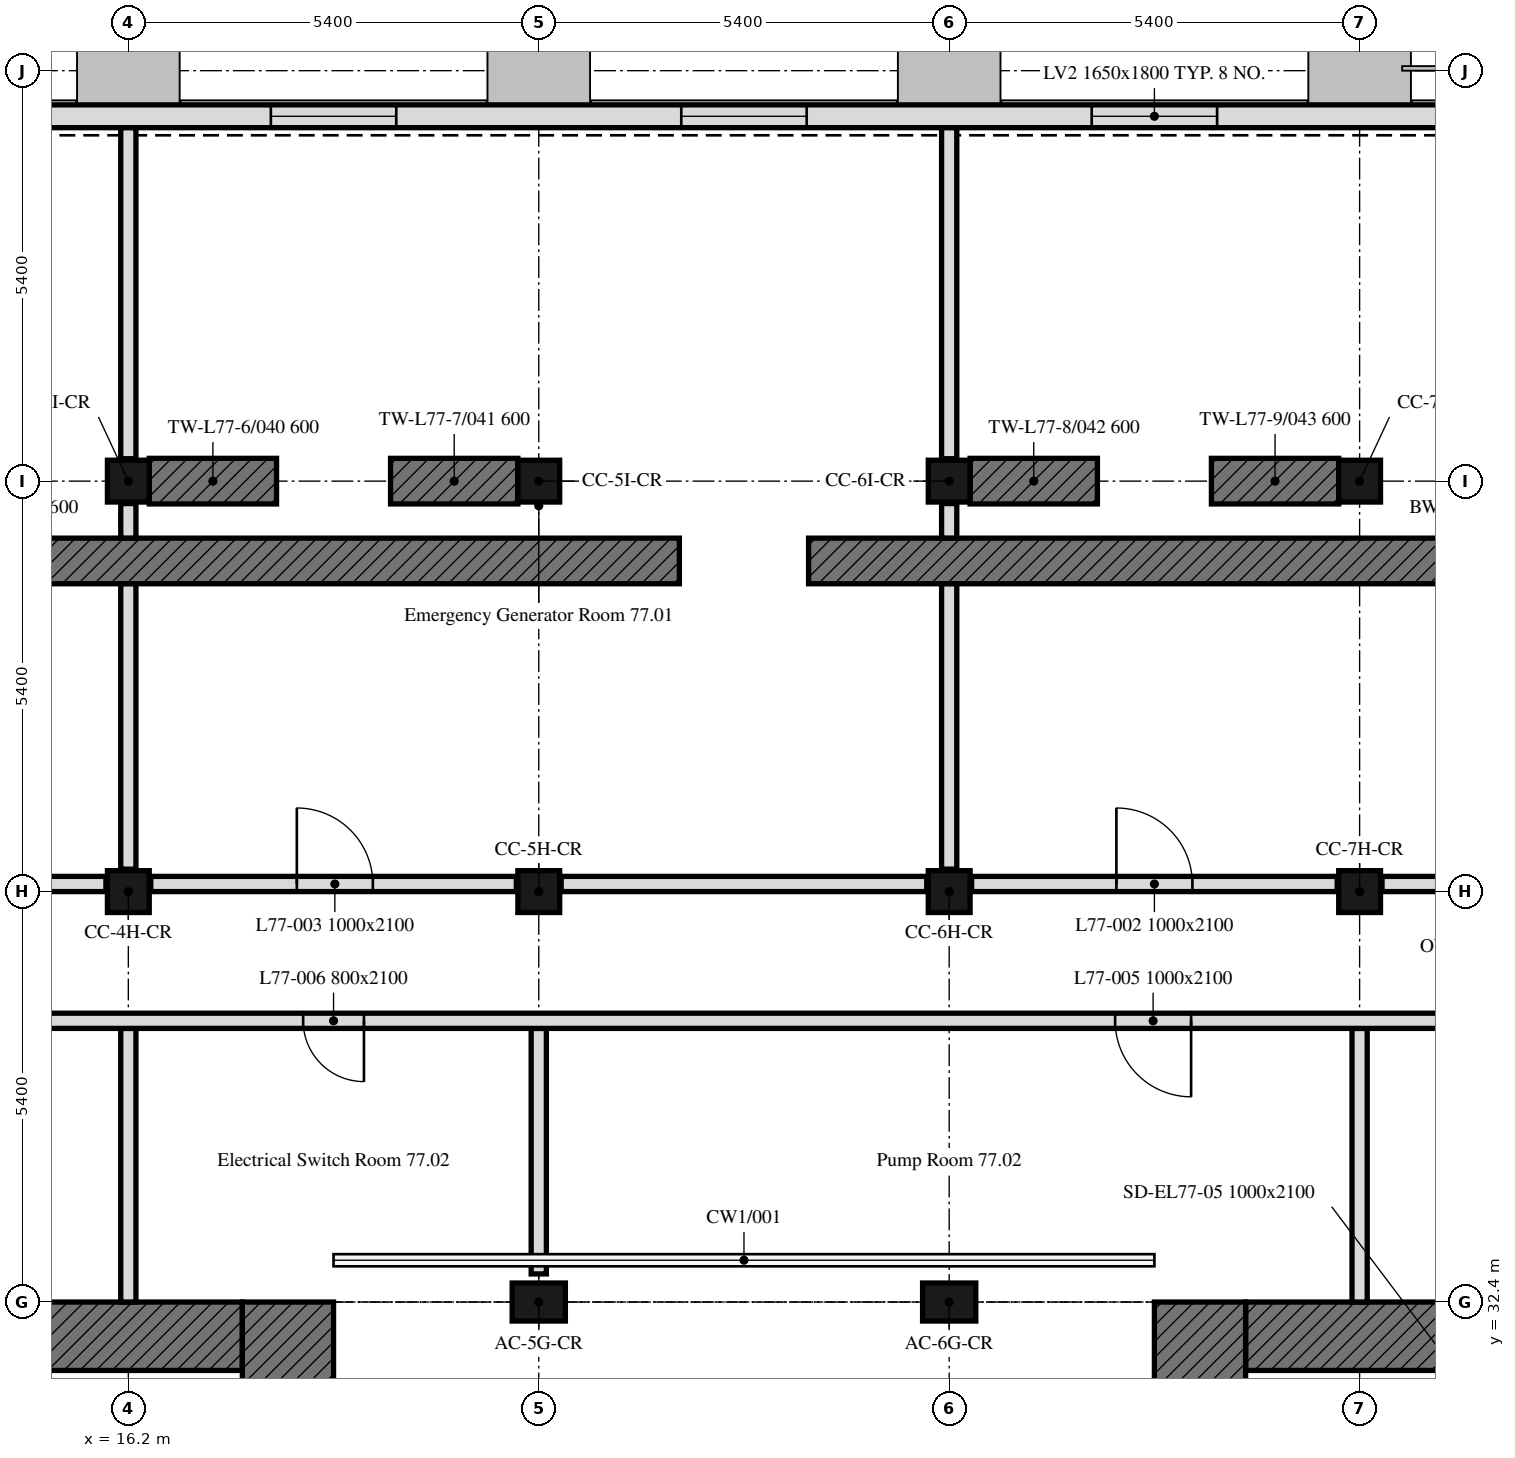
"""IFC4 building model, lengths in metres.
Left out: names, types, materials, properties, quantities, classifications, styles, units other than length and angle.
Written with IfcOpenShell. Run it as: python <this file> out.ifc"""

import sys

from ifc_helpers import new_model, si_unit, direction, frame, frame_2d, origin, origin_2d, place, context, subcontext, project, spatial, polyline, rectangle, outline, extrude, element, fill, save


model = new_model("IFC4")
c1 = context("Model", 3, precision=1e-05, world=origin(), true_north=direction((0.0, 1.0)))
c2 = subcontext(c1, "Body", "Model", "MODEL_VIEW")
j1 = project(units=[si_unit("LENGTHUNIT", "METRE"), si_unit("PLANEANGLEUNIT", "RADIAN")], contexts=[c1])
p1 = place(None, origin())
s1 = spatial("IfcSite", under=j1, at=p1, CompositionType="ELEMENT")
p2 = place(p1, origin())
s2 = spatial("IfcBuilding", under=s1, at=p2, CompositionType="ELEMENT")
p3 = place(p2, frame((0.0, 0.0, 308.2)))
s3 = spatial("IfcBuildingStorey", under=s2, at=p3, CompositionType="ELEMENT", Elevation=308.2)
for number, where, z_axis, x_axis in (
    (1, (21.6, 32.4, 0.0), (0.0, 0.0, 1.0), (1.0, 0.0, 0.0)),
    (2, (27.0, 32.4, 0.0), (0.0, 0.0, 1.0), (1.0, 0.0, 0.0)),
):
    element("IfcColumn", number, at=place(p3, frame(where, z_axis=z_axis, x_axis=x_axis)), inside=s3, PredefinedType="COLUMN", context=c2, shape_type="SweptSolid", body=[
        extrude(rectangle(XDim=0.7, YDim=0.5, at=origin_2d()), origin(), (0.0, 0.0, 1.0), 4.2),
    ])
for number, where, z_axis, x_axis in (
    (3, (16.2, 37.8, 0.0), (0.0, 0.0, 1.0), (1.0, 0.0, 0.0)),
    (4, (21.6, 37.8, 0.0), (0.0, 0.0, 1.0), (1.0, 0.0, 0.0)),
    (5, (27.0, 37.8, 0.0), (0.0, 0.0, 1.0), (1.0, 0.0, 0.0)),
    (6, (32.4, 37.8, 0.0), (0.0, 0.0, 1.0), (1.0, 0.0, 0.0)),
    (7, (16.2, 43.2, 0.0), (0.0, 0.0, 1.0), (1.0, 0.0, 0.0)),
    (8, (21.6, 43.2, 0.0), (0.0, 0.0, 1.0), (1.0, 0.0, 0.0)),
    (9, (27.0, 43.2, 0.0), (0.0, 0.0, 1.0), (1.0, 0.0, 0.0)),
    (10, (32.4, 43.2, 0.0), (0.0, 0.0, 1.0), (1.0, 0.0, 0.0)),
):
    element("IfcColumn", number, at=place(p3, frame(where, z_axis=z_axis, x_axis=x_axis)), inside=s3, PredefinedType="COLUMN", context=c2, shape_type="SweptSolid", body=[
        extrude(rectangle(XDim=0.55, YDim=0.55, at=origin_2d()), origin(), (0.0, 0.0, 1.0), 4.2),
    ])
for number, where, z_axis, x_axis in (
    (11, (6.45, 42.15, 0.0), (0.0, 0.0, 1.0), (1.0, 0.0, 0.0)),
    (12, (25.15, 42.15, 0.0), (0.0, 0.0, 1.0), (1.0, 0.0, 0.0)),
):
    element("IfcWall", number, at=place(p3, frame(where, z_axis=z_axis, x_axis=x_axis)), inside=s3, PredefinedType="SHEAR", context=c2, shape_type="SweptSolid", body=[
        extrude(rectangle(XDim=17.0, YDim=0.6, at=frame_2d((8.5, 0.0))), origin(), (0.0, 0.0, 1.0), 4.2),
    ])
p4 = place(p3, frame((16.475, 43.2, 0.0), z_axis=(0.0, 0.0, 1.0), x_axis=(1.0, 0.0, 0.0)))
e13 = element("IfcWall", 13, at=p4, inside=s3, PredefinedType="SHEAR", context=c2, shape_type="SweptSolid", body=[
    extrude(rectangle(XDim=1.675, YDim=0.6, at=frame_2d((0.837, 0.0))), origin(), (0.0, 0.0, 1.0), 4.2),
])
for number, where, z_axis, x_axis in (
    (14, (19.65, 43.2, 0.0), (0.0, 0.0, 1.0), (1.0, 0.0, 0.0)),
    (15, (27.275, 43.2, 0.0), (0.0, 0.0, 1.0), (1.0, 0.0, 0.0)),
    (16, (30.45, 43.2, 0.0), (0.0, 0.0, 1.0), (1.0, 0.0, 0.0)),
):
    element("IfcWall", number, at=place(p3, frame(where, z_axis=z_axis, x_axis=x_axis)), inside=s3, PredefinedType="SHEAR", context=c2, shape_type="SweptSolid", body=[
        extrude(rectangle(XDim=1.675, YDim=0.6, at=frame_2d((0.837, 0.0))), origin(), (0.0, 0.0, 1.0), 4.2),
    ])
p5 = place(p3, frame((37.614, 48.0, 0.0), z_axis=(0.0, 0.0, 1.0), x_axis=(-1.0, 0.0, 0.0)))
e17 = element("IfcWall", 17, at=p5, inside=s3, PredefinedType="SOLIDWALL", context=c2, shape_type="SweptSolid", body=[
    extrude(outline(polyline([(0.0, 0.0), (32.027, 0.0), (32.027, 4.2), (31.434, 4.2), (30.841, 4.2), (30.248, 4.2), (29.655, 4.2), (29.062, 4.2), (28.469, 4.2), (27.875, 4.2), (27.282, 4.2), (26.689, 4.2), (26.096, 4.2), (25.503, 4.2), (24.91, 4.2), (24.317, 4.2), (23.724, 4.2), (23.131, 4.2), (22.538, 4.2), (21.945, 4.2), (21.352, 4.2), (20.758, 4.2), (20.165, 4.2), (19.572, 4.2), (18.979, 4.2), (18.386, 4.2), (17.793, 4.2), (17.2, 4.2), (16.607, 4.2), (16.014, 4.2), (15.42, 4.2), (14.827, 4.2), (14.234, 4.2), (13.641, 4.2), (13.048, 4.2), (12.455, 4.2), (11.862, 4.2), (11.269, 4.2), (10.676, 4.2), (10.083, 4.2), (9.49, 4.2), (8.896, 4.2), (8.303, 4.2), (7.71, 4.2), (7.117, 4.2), (6.524, 4.2), (5.931, 4.2), (5.338, 4.2), (4.745, 4.2), (4.152, 4.2), (3.559, 4.2), (2.966, 4.2), (2.372, 4.2), (1.779, 4.2), (1.186, 4.2), (0.593, 4.2), (0.0, 4.2), (0.0, 0.0)])), frame((0.0, 0.15, 0.0), z_axis=(0.0, -1.0, 0.0), x_axis=(1.0, 0.0, 0.0)), (0.0, 0.0, 1.0), 0.3),
])
p6 = place(p5, frame((1.014, 0.0, 0.6)))
e18 = element("IfcOpeningElement", 18, at=p6, cuts=e17, PredefinedType="OPENING", context=c2, shape_type="SweptSolid", body=[
    extrude(rectangle(XDim=3.0, YDim=1.8, at=frame_2d((1.5, 0.9))), frame((0.0, 0.16, 0.0), z_axis=(0.0, -1.0, 0.0), x_axis=(1.0, 0.0, 0.0)), (0.0, 0.0, 1.0), 0.32),
])
p7 = place(p5, frame((7.089, 0.0, 0.6)))
e19 = element("IfcOpeningElement", 19, at=p7, cuts=e17, PredefinedType="OPENING", context=c2, shape_type="SweptSolid", body=[
    extrude(rectangle(XDim=1.65, YDim=1.8, at=frame_2d((0.825, 0.9))), frame((0.0, 0.16, 0.0), z_axis=(0.0, -1.0, 0.0), x_axis=(1.0, 0.0, 0.0)), (0.0, 0.0, 1.0), 0.32),
])
p8 = place(p5, frame((12.489, 0.0, 0.6)))
e20 = element("IfcOpeningElement", 20, at=p8, cuts=e17, PredefinedType="OPENING", context=c2, shape_type="SweptSolid", body=[
    extrude(rectangle(XDim=1.65, YDim=1.8, at=frame_2d((0.825, 0.9))), frame((0.0, 0.16, 0.0), z_axis=(0.0, -1.0, 0.0), x_axis=(1.0, 0.0, 0.0)), (0.0, 0.0, 1.0), 0.32),
])
p9 = place(p5, frame((17.889, 0.0, 0.6)))
e21 = element("IfcOpeningElement", 21, at=p9, cuts=e17, PredefinedType="OPENING", context=c2, shape_type="SweptSolid", body=[
    extrude(rectangle(XDim=1.65, YDim=1.8, at=frame_2d((0.825, 0.9))), frame((0.0, 0.16, 0.0), z_axis=(0.0, -1.0, 0.0), x_axis=(1.0, 0.0, 0.0)), (0.0, 0.0, 1.0), 0.32),
])
p10 = place(p5, frame((23.289, 0.0, 0.6)))
e22 = element("IfcOpeningElement", 22, at=p10, cuts=e17, PredefinedType="OPENING", context=c2, shape_type="SweptSolid", body=[
    extrude(rectangle(XDim=1.65, YDim=1.8, at=frame_2d((0.825, 0.9))), frame((0.0, 0.16, 0.0), z_axis=(0.0, -1.0, 0.0), x_axis=(1.0, 0.0, 0.0)), (0.0, 0.0, 1.0), 0.32),
])
p11 = place(p5, frame((28.014, 0.0, 0.6)))
e23 = element("IfcOpeningElement", 23, at=p11, cuts=e17, PredefinedType="OPENING", context=c2, shape_type="SweptSolid", body=[
    extrude(rectangle(XDim=3.0, YDim=1.8, at=frame_2d((1.5, 0.9))), frame((0.0, 0.16, 0.0), z_axis=(0.0, -1.0, 0.0), x_axis=(1.0, 0.0, 0.0)), (0.0, 0.0, 1.0), 0.32),
])
p12 = place(p3, frame((6.6, 31.95, 0.0), z_axis=(0.0, 0.0, 1.0), x_axis=(1.0, 0.0, 0.0)))
e24 = element("IfcWall", 24, at=p12, inside=s3, PredefinedType="SOLIDWALL", context=c2, shape_type="SweptSolid", body=[
    extrude(rectangle(XDim=11.1, YDim=0.9, at=frame_2d((5.55, 0.0))), origin(), (0.0, 0.0, 1.0), 4.2),
])
p13 = place(p12, frame((3.55, 0.0, 0.0)))
e25 = element("IfcOpeningElement", 25, at=p13, cuts=e24, PredefinedType="OPENING", context=c2, shape_type="SweptSolid", body=[
    extrude(rectangle(XDim=2.0, YDim=2.4, at=frame_2d((1.0, 1.2))), frame((0.0, 0.45, 0.0), z_axis=(0.0, -1.0, 0.0), x_axis=(1.0, 0.0, 0.0)), (0.0, 0.0, 1.0), 0.9),
])
p14 = place(p3, frame((18.3, 32.4, 0.0), z_axis=(0.0, 0.0, 1.0), x_axis=(0.0, -1.0, 0.0)))
e26 = element("IfcWall", 26, at=p14, inside=s3, PredefinedType="SOLIDWALL", context=c2, shape_type="SweptSolid", body=[
    extrude(rectangle(XDim=16.2, YDim=1.2, at=frame_2d((8.1, 0.0))), origin(), (0.0, 0.0, 1.0), 4.2),
])
p15 = place(p3, frame((30.9, 31.95, 0.0), z_axis=(0.0, 0.0, 1.0), x_axis=(1.0, 0.0, 0.0)))
e27 = element("IfcWall", 27, at=p15, inside=s3, PredefinedType="SOLIDWALL", context=c2, shape_type="SweptSolid", body=[
    extrude(rectangle(XDim=11.1, YDim=0.9, at=frame_2d((5.55, 0.0))), origin(), (0.0, 0.0, 1.0), 4.2),
])
p16 = place(p15, frame((5.55, 0.0, 0.0)))
e28 = element("IfcOpeningElement", 28, at=p16, cuts=e27, PredefinedType="OPENING", context=c2, shape_type="SweptSolid", body=[
    extrude(rectangle(XDim=2.0, YDim=2.4, at=frame_2d((1.0, 1.2))), frame((0.0, 0.45, 0.0), z_axis=(0.0, -1.0, 0.0), x_axis=(1.0, 0.0, 0.0)), (0.0, 0.0, 1.0), 0.9),
])
p17 = place(p3, frame((30.3, 16.2, 0.0), z_axis=(0.0, 0.0, 1.0), x_axis=(0.0, 1.0, 0.0)))
e29 = element("IfcWall", 29, at=p17, inside=s3, PredefinedType="SOLIDWALL", context=c2, shape_type="SweptSolid", body=[
    extrude(rectangle(XDim=16.2, YDim=1.2, at=frame_2d((8.1, 0.0))), origin(), (0.0, 0.0, 1.0), 4.2),
])
p18 = place(p3, frame((27.0, 47.849, 0.0), z_axis=(0.0, 0.0, 1.0), x_axis=(0.0, -1.0, 0.0)))
e30 = element("IfcWall", 30, at=p18, inside=s3, PredefinedType="PARTITIONING", context=c2, shape_type="SweptSolid", body=[
    extrude(rectangle(XDim=4.354, YDim=0.2, at=frame_2d((2.177, 0.0))), origin(), (0.0, 0.0, 1.0), 3.45),
])
p19 = place(p3, frame((27.0, 42.905, 0.0), z_axis=(0.0, 0.0, 1.0), x_axis=(0.0, -1.0, 0.0)))
e31 = element("IfcWall", 31, at=p19, inside=s3, PredefinedType="PARTITIONING", context=c2, shape_type="SweptSolid", body=[
    extrude(rectangle(XDim=0.454, YDim=0.2, at=frame_2d((0.227, 0.0))), origin(), (0.0, 0.0, 1.0), 3.45),
])
p20 = place(p3, frame((27.0, 41.849, 0.0), z_axis=(0.0, 0.0, 1.0), x_axis=(0.0, -1.0, 0.0)))
e32 = element("IfcWall", 32, at=p20, inside=s3, PredefinedType="PARTITIONING", context=c2, shape_type="SweptSolid", body=[
    extrude(rectangle(XDim=3.754, YDim=0.2, at=frame_2d((1.877, 0.0))), origin(), (0.0, 0.0, 1.0), 3.45),
])
p21 = place(p3, frame((27.295, 37.9, 0.0), z_axis=(0.0, 0.0, 1.0), x_axis=(1.0, 0.0, 0.0)))
e33 = element("IfcWall", 33, at=p21, inside=s3, PredefinedType="PARTITIONING", context=c2, shape_type="SweptSolid", body=[
    extrude(rectangle(XDim=4.81, YDim=0.2, at=frame_2d((2.405, 0.0))), origin(), (0.0, 0.0, 1.0), 4.2),
])
p22 = place(p21, frame((1.905, 0.0, 0.0)))
e34 = element("IfcOpeningElement", 34, at=p22, cuts=e33, PredefinedType="OPENING", context=c2, shape_type="SweptSolid", body=[
    extrude(rectangle(XDim=1.0, YDim=2.1, at=frame_2d((0.5, 1.05))), frame((0.0, 0.1, 0.0), z_axis=(0.0, -1.0, 0.0), x_axis=(1.0, 0.0, 0.0)), (0.0, 0.0, 1.0), 0.2),
])
p23 = place(p3, frame((32.695, 37.9, 0.0), z_axis=(0.0, 0.0, 1.0), x_axis=(1.0, 0.0, 0.0)))
e35 = element("IfcWall", 35, at=p23, inside=s3, PredefinedType="PARTITIONING", context=c2, shape_type="SweptSolid", body=[
    extrude(rectangle(XDim=1.129, YDim=0.2, at=frame_2d((0.564, 0.0))), origin(), (0.0, 0.0, 1.0), 4.2),
])
p24 = place(p3, frame((16.2, 47.849, 0.0), z_axis=(0.0, 0.0, 1.0), x_axis=(0.0, -1.0, 0.0)))
e36 = element("IfcWall", 36, at=p24, inside=s3, PredefinedType="PARTITIONING", context=c2, shape_type="SweptSolid", body=[
    extrude(rectangle(XDim=4.354, YDim=0.2, at=frame_2d((2.177, 0.0))), origin(), (0.0, 0.0, 1.0), 3.45),
])
p25 = place(p3, frame((16.2, 42.905, 0.0), z_axis=(0.0, 0.0, 1.0), x_axis=(0.0, -1.0, 0.0)))
e37 = element("IfcWall", 37, at=p25, inside=s3, PredefinedType="PARTITIONING", context=c2, shape_type="SweptSolid", body=[
    extrude(rectangle(XDim=0.454, YDim=0.2, at=frame_2d((0.227, 0.0))), origin(), (0.0, 0.0, 1.0), 3.45),
])
p26 = place(p3, frame((16.2, 41.849, 0.0), z_axis=(0.0, 0.0, 1.0), x_axis=(0.0, -1.0, 0.0)))
e38 = element("IfcWall", 38, at=p26, inside=s3, PredefinedType="PARTITIONING", context=c2, shape_type="SweptSolid", body=[
    extrude(rectangle(XDim=3.754, YDim=0.2, at=frame_2d((1.877, 0.0))), origin(), (0.0, 0.0, 1.0), 3.45),
])
p27 = place(p3, frame((16.495, 37.9, 0.0), z_axis=(0.0, 0.0, 1.0), x_axis=(1.0, 0.0, 0.0)))
e39 = element("IfcWall", 39, at=p27, inside=s3, PredefinedType="PARTITIONING", context=c2, shape_type="SweptSolid", body=[
    extrude(rectangle(XDim=4.81, YDim=0.2, at=frame_2d((2.405, 0.0))), origin(), (0.0, 0.0, 1.0), 4.2),
])
p28 = place(p27, frame((1.922, 0.0, 0.0)))
e40 = element("IfcOpeningElement", 40, at=p28, cuts=e39, PredefinedType="OPENING", context=c2, shape_type="SweptSolid", body=[
    extrude(rectangle(XDim=1.0, YDim=2.1, at=frame_2d((0.5, 1.05))), frame((0.0, 0.1, 0.0), z_axis=(0.0, -1.0, 0.0), x_axis=(1.0, 0.0, 0.0)), (0.0, 0.0, 1.0), 0.2),
])
p29 = place(p3, frame((21.895, 37.9, 0.0), z_axis=(0.0, 0.0, 1.0), x_axis=(1.0, 0.0, 0.0)))
e41 = element("IfcWall", 41, at=p29, inside=s3, PredefinedType="PARTITIONING", context=c2, shape_type="SweptSolid", body=[
    extrude(rectangle(XDim=4.81, YDim=0.2, at=frame_2d((2.405, 0.0))), origin(), (0.0, 0.0, 1.0), 4.2),
])
p30 = place(p3, frame((13.876, 37.9, 0.0), z_axis=(0.0, 0.0, 1.0), x_axis=(1.0, 0.0, 0.0)))
e42 = element("IfcWall", 42, at=p30, inside=s3, PredefinedType="PARTITIONING", context=c2, shape_type="SweptSolid", body=[
    extrude(rectangle(XDim=2.029, YDim=0.2, at=frame_2d((1.015, 0.0))), origin(), (0.0, 0.0, 1.0), 3.45),
])
p31 = place(p3, frame((32.4, 32.4, 0.0), z_axis=(0.0, 0.0, 1.0), x_axis=(0.0, 1.0, 0.0)))
e43 = element("IfcWall", 43, at=p31, inside=s3, PredefinedType="PARTITIONING", context=c2, shape_type="SweptSolid", body=[
    extrude(rectangle(XDim=3.6, YDim=0.2, at=frame_2d((1.8, 0.0))), origin(), (0.0, 0.0, 1.0), 3.45),
])
p32 = place(p3, frame((21.6, 36.0, 0.0), z_axis=(0.0, 0.0, 1.0), x_axis=(0.0, -1.0, 0.0)))
e44 = element("IfcWall", 44, at=p32, inside=s3, PredefinedType="PARTITIONING", context=c2, shape_type="SweptSolid", body=[
    extrude(rectangle(XDim=3.23, YDim=0.2, at=frame_2d((1.615, 0.0))), origin(), (0.0, 0.0, 1.0), 3.45),
])
p33 = place(p3, frame((16.2, 36.0, 0.0), z_axis=(0.0, 0.0, 1.0), x_axis=(0.0, -1.0, 0.0)))
e45 = element("IfcWall", 45, at=p33, inside=s3, PredefinedType="PARTITIONING", context=c2, shape_type="SweptSolid", body=[
    extrude(rectangle(XDim=3.6, YDim=0.2, at=frame_2d((1.8, 0.0))), origin(), (0.0, 0.0, 1.0), 3.45),
])
p34 = place(p3, frame((33.824, 36.1, 0.0), z_axis=(0.0, 0.0, 1.0), x_axis=(-1.0, 0.0, 0.0)))
e46 = element("IfcWall", 46, at=p34, inside=s3, PredefinedType="PARTITIONING", context=c2, shape_type="SweptSolid", body=[
    extrude(rectangle(XDim=19.948, YDim=0.2, at=frame_2d((9.974, 0.0))), origin(), (0.0, 0.0, 1.0), 3.45),
])
p35 = place(p34, frame((3.641, 0.0, 0.0)))
e47 = element("IfcOpeningElement", 47, at=p35, cuts=e46, PredefinedType="OPENING", context=c2, shape_type="SweptSolid", body=[
    extrude(rectangle(XDim=1.0, YDim=2.1, at=frame_2d((0.5, 1.05))), frame((0.0, 0.1, 0.0), z_axis=(0.0, -1.0, 0.0), x_axis=(1.0, 0.0, 0.0)), (0.0, 0.0, 1.0), 0.2),
])
p36 = place(p34, frame((14.524, 0.0, 0.0)))
e48 = element("IfcOpeningElement", 48, at=p36, cuts=e46, PredefinedType="OPENING", context=c2, shape_type="SweptSolid", body=[
    extrude(rectangle(XDim=0.8, YDim=2.1, at=frame_2d((0.4, 1.05))), frame((0.0, 0.1, 0.0), z_axis=(0.0, -1.0, 0.0), x_axis=(1.0, 0.0, 0.0)), (0.0, 0.0, 1.0), 0.2),
])
p37 = place(p7, origin())
e49 = element("IfcWindow", 49, at=p37, inside=s3, PartitioningType="SINGLE_PANEL", PredefinedType="WINDOW", context=c2, shape_type="SweptSolid", body=[
    extrude(rectangle(XDim=1.65, YDim=1.8, at=frame_2d((0.825, 0.9))), frame((0.0, 0.03, 0.0), z_axis=(0.0, -1.0, 0.0), x_axis=(1.0, 0.0, 0.0)), (0.0, 0.0, 1.0), 0.06),
])
fill(e19, e49)
p38 = place(p8, origin())
e50 = element("IfcWindow", 50, at=p38, inside=s3, PartitioningType="SINGLE_PANEL", PredefinedType="WINDOW", context=c2, shape_type="SweptSolid", body=[
    extrude(rectangle(XDim=1.65, YDim=1.8, at=frame_2d((0.825, 0.9))), frame((0.0, 0.03, 0.0), z_axis=(0.0, -1.0, 0.0), x_axis=(1.0, 0.0, 0.0)), (0.0, 0.0, 1.0), 0.06),
])
fill(e20, e50)
p39 = place(p9, origin())
e51 = element("IfcWindow", 51, at=p39, inside=s3, PartitioningType="SINGLE_PANEL", PredefinedType="WINDOW", context=c2, shape_type="SweptSolid", body=[
    extrude(rectangle(XDim=1.65, YDim=1.8, at=frame_2d((0.825, 0.9))), frame((0.0, 0.03, 0.0), z_axis=(0.0, -1.0, 0.0), x_axis=(1.0, 0.0, 0.0)), (0.0, 0.0, 1.0), 0.06),
])
fill(e21, e51)
p40 = place(p22, origin())
e52 = element("IfcDoor", 52, at=p40, inside=s3, OperationType="SINGLE_SWING_RIGHT", PredefinedType="DOOR", context=c2, shape_type="SweptSolid", body=[
    extrude(rectangle(XDim=1.0, YDim=2.1, at=frame_2d((0.5, 1.05))), frame((0.0, 0.025, 0.0), z_axis=(0.0, -1.0, 0.0), x_axis=(1.0, 0.0, 0.0)), (0.0, 0.0, 1.0), 0.05),
])
fill(e34, e52)
p41 = place(p28, origin())
e53 = element("IfcDoor", 53, at=p41, inside=s3, OperationType="SINGLE_SWING_LEFT", PredefinedType="DOOR", context=c2, shape_type="SweptSolid", body=[
    extrude(rectangle(XDim=1.0, YDim=2.1, at=frame_2d((0.5, 1.05))), frame((0.0, 0.025, 0.0), z_axis=(0.0, -1.0, 0.0), x_axis=(1.0, 0.0, 0.0)), (0.0, 0.0, 1.0), 0.05),
])
fill(e40, e53)
p42 = place(p35, origin())
e54 = element("IfcDoor", 54, at=p42, inside=s3, OperationType="SINGLE_SWING_LEFT", PredefinedType="DOOR", context=c2, shape_type="SweptSolid", body=[
    extrude(rectangle(XDim=1.0, YDim=2.1, at=frame_2d((0.5, 1.05))), frame((0.0, 0.025, 0.0), z_axis=(0.0, -1.0, 0.0), x_axis=(1.0, 0.0, 0.0)), (0.0, 0.0, 1.0), 0.05),
])
fill(e47, e54)
p43 = place(p36, origin())
e55 = element("IfcDoor", 55, at=p43, inside=s3, OperationType="SINGLE_SWING_RIGHT", PredefinedType="DOOR", context=c2, shape_type="SweptSolid", body=[
    extrude(rectangle(XDim=0.8, YDim=2.1, at=frame_2d((0.4, 1.05))), frame((0.0, 0.025, 0.0), z_axis=(0.0, -1.0, 0.0), x_axis=(1.0, 0.0, 0.0)), (0.0, 0.0, 1.0), 0.05),
])
fill(e48, e55)
save(model, sys.argv[1])
